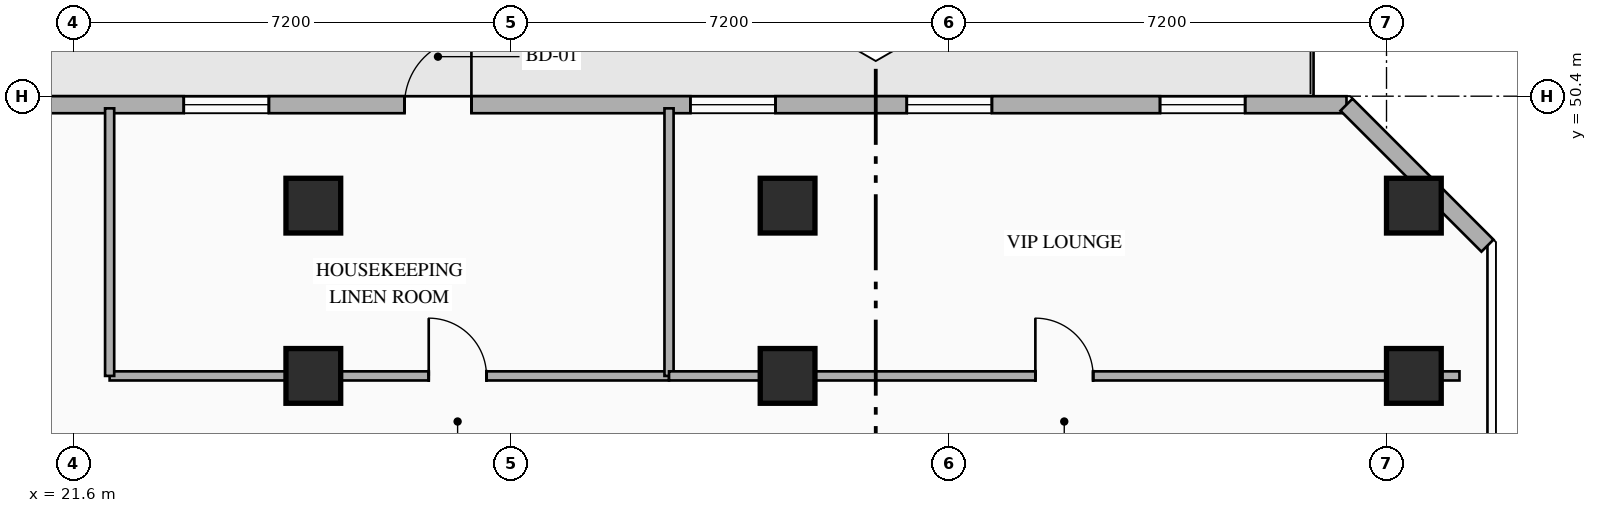
"""IFC4 building model, lengths in metres.
Left out: names, types, materials, properties, quantities, classifications, styles, units other than length and angle.
Written with IfcOpenShell. Run it as: python <this file> out.ifc"""

import sys

from ifc_helpers import new_model, si_unit, direction, frame, frame_2d, origin, origin_2d, place, context, subcontext, project, spatial, rectangle, hollow_rectangle, extrude, element, fill, save


model = new_model("IFC4")
c1 = context("Model", 3, precision=1e-05, world=origin(), true_north=direction((0.0, 1.0)))
c2 = subcontext(c1, "Body", "Model", "MODEL_VIEW")
j1 = project(units=[si_unit("LENGTHUNIT", "METRE"), si_unit("PLANEANGLEUNIT", "RADIAN")], contexts=[c1])
p1 = place(None, origin())
s1 = spatial("IfcSite", under=j1, at=p1, CompositionType="ELEMENT")
p2 = place(p1, origin())
s2 = spatial("IfcBuilding", under=s1, at=p2, CompositionType="ELEMENT")
p3 = place(p2, frame((0.0, 0.0, 88.0)))
s3 = spatial("IfcBuildingStorey", under=s2, at=p3, CompositionType="ELEMENT", Elevation=88.0)
for number, where, z_axis, x_axis in (
    (1, (25.55, 45.8, 0.0), (0.0, 0.0, 1.0), (1.0, 0.0, 0.0)),
    (2, (33.35, 45.8, 0.0), (0.0, 0.0, 1.0), (1.0, 0.0, 0.0)),
    (3, (43.65, 45.8, 0.0), (0.0, 0.0, 1.0), (1.0, 0.0, 0.0)),
    (4, (25.55, 48.6, 0.0), (0.0, 0.0, 1.0), (1.0, 0.0, 0.0)),
    (5, (33.35, 48.6, 0.0), (0.0, 0.0, 1.0), (1.0, 0.0, 0.0)),
    (6, (43.65, 48.6, 0.0), (0.0, 0.0, 1.0), (1.0, 0.0, 0.0)),
):
    element("IfcColumn", number, at=place(p3, frame(where, z_axis=z_axis, x_axis=x_axis)), inside=s3, PredefinedType="COLUMN", context=c2, shape_type="SweptSolid", body=[
        extrude(hollow_rectangle(XDim=0.9, YDim=0.9, WallThickness=0.036, at=origin_2d()), origin(), (0.0, 0.0, 1.0), 3.35),
    ])
p4 = place(p3, frame((12.058, 50.26, 0.0), z_axis=(0.0, 0.0, 1.0), x_axis=(1.0, 0.0, 0.0)))
e7 = element("IfcWall", 7, at=p4, inside=s3, PredefinedType="STANDARD", context=c2, shape_type="SweptSolid", body=[
    extrude(rectangle(XDim=30.484, YDim=0.28, at=frame_2d((15.242, 0.0))), origin(), (0.0, 0.0, 1.0), 3.05),
])
p5 = place(p4, frame((14.992, 0.0, 0.0)))
e8 = element("IfcOpeningElement", 8, at=p5, cuts=e7, PredefinedType="OPENING", context=c2, shape_type="SweptSolid", body=[
    extrude(rectangle(XDim=1.1, YDim=2.2, at=frame_2d((0.55, 1.1))), frame((0.0, 0.15, 0.0), z_axis=(0.0, -1.0, 0.0), x_axis=(1.0, 0.0, 0.0)), (0.0, 0.0, 1.0), 0.3),
])
p6 = place(p4, frame((0.46, 0.0, 0.85)))
e9 = element("IfcOpeningElement", 9, at=p6, cuts=e7, PredefinedType="OPENING", context=c2, shape_type="SweptSolid", body=[
    extrude(rectangle(XDim=1.4, YDim=1.8, at=frame_2d((0.7, 0.9))), frame((0.0, 0.15, 0.0), z_axis=(0.0, -1.0, 0.0), x_axis=(1.0, 0.0, 0.0)), (0.0, 0.0, 1.0), 0.3),
])
p7 = place(p4, frame((4.435, 0.0, 0.85)))
e10 = element("IfcOpeningElement", 10, at=p7, cuts=e7, PredefinedType="OPENING", context=c2, shape_type="SweptSolid", body=[
    extrude(rectangle(XDim=1.4, YDim=1.8, at=frame_2d((0.7, 0.9))), frame((0.0, 0.15, 0.0), z_axis=(0.0, -1.0, 0.0), x_axis=(1.0, 0.0, 0.0)), (0.0, 0.0, 1.0), 0.3),
])
p8 = place(p4, frame((11.361, 0.0, 0.85)))
e11 = element("IfcOpeningElement", 11, at=p8, cuts=e7, PredefinedType="OPENING", context=c2, shape_type="SweptSolid", body=[
    extrude(rectangle(XDim=1.4, YDim=1.8, at=frame_2d((0.7, 0.9))), frame((0.0, 0.15, 0.0), z_axis=(0.0, -1.0, 0.0), x_axis=(1.0, 0.0, 0.0)), (0.0, 0.0, 1.0), 0.3),
])
p9 = place(p4, frame((19.693, 0.0, 0.85)))
e12 = element("IfcOpeningElement", 12, at=p9, cuts=e7, PredefinedType="OPENING", context=c2, shape_type="SweptSolid", body=[
    extrude(rectangle(XDim=1.4, YDim=1.8, at=frame_2d((0.7, 0.9))), frame((0.0, 0.15, 0.0), z_axis=(0.0, -1.0, 0.0), x_axis=(1.0, 0.0, 0.0)), (0.0, 0.0, 1.0), 0.3),
])
p10 = place(p4, frame((23.252, 0.0, 0.85)))
e13 = element("IfcOpeningElement", 13, at=p10, cuts=e7, PredefinedType="OPENING", context=c2, shape_type="SweptSolid", body=[
    extrude(rectangle(XDim=1.4, YDim=1.8, at=frame_2d((0.7, 0.9))), frame((0.0, 0.15, 0.0), z_axis=(0.0, -1.0, 0.0), x_axis=(1.0, 0.0, 0.0)), (0.0, 0.0, 1.0), 0.3),
])
p11 = place(p4, frame((27.417, 0.0, 0.85)))
e14 = element("IfcOpeningElement", 14, at=p11, cuts=e7, PredefinedType="OPENING", context=c2, shape_type="SweptSolid", body=[
    extrude(rectangle(XDim=1.4, YDim=1.8, at=frame_2d((0.7, 0.9))), frame((0.0, 0.15, 0.0), z_axis=(0.0, -1.0, 0.0), x_axis=(1.0, 0.0, 0.0)), (0.0, 0.0, 1.0), 0.3),
])
p12 = place(p3, frame((42.542, 50.26, 0.0), z_axis=(0.0, 0.0, 1.0), x_axis=(0.707106781187, -0.707106781187, 0.0)))
e15 = element("IfcWall", 15, at=p12, inside=s3, PredefinedType="STANDARD", context=c2, shape_type="SweptSolid", body=[
    extrude(rectangle(XDim=3.278, YDim=0.28, at=frame_2d((1.639, 0.0))), origin(), (0.0, 0.0, 1.0), 3.05),
])
p13 = place(p3, frame((22.2, 45.8, 0.0), z_axis=(0.0, 0.0, 1.0), x_axis=(1.0, 0.0, 0.0)))
e16 = element("IfcWall", 16, at=p13, inside=s3, PredefinedType="PARTITIONING", context=c2, shape_type="SweptSolid", body=[
    extrude(rectangle(XDim=9.2, YDim=0.15, at=frame_2d((4.6, 0.0))), origin(), (0.0, 0.0, 1.0), 2.345),
])
p14 = place(p13, frame((5.248, 0.0, 0.0)))
e17 = element("IfcOpeningElement", 17, at=p14, cuts=e16, PredefinedType="OPENING", context=c2, shape_type="SweptSolid", body=[
    extrude(rectangle(XDim=0.95, YDim=2.15, at=frame_2d((0.475, 1.075))), frame((0.0, 0.085, 0.0), z_axis=(0.0, -1.0, 0.0), x_axis=(1.0, 0.0, 0.0)), (0.0, 0.0, 1.0), 0.17),
])
for number, where, z_axis, x_axis in (
    (18, (22.2, 45.8, 0.0), (0.0, 0.0, 1.0), (0.0, 1.0, 0.0)),
    (19, (31.4, 45.8, 0.0), (0.0, 0.0, 1.0), (0.0, 1.0, 0.0)),
):
    element("IfcWall", number, at=place(p3, frame(where, z_axis=z_axis, x_axis=x_axis)), inside=s3, PredefinedType="PARTITIONING", context=c2, shape_type="SweptSolid", body=[
        extrude(rectangle(XDim=4.4, YDim=0.15, at=frame_2d((2.2, 0.0))), origin(), (0.0, 0.0, 1.0), 3.05),
    ])
p15 = place(p3, frame((31.4, 45.8, 0.0), z_axis=(0.0, 0.0, 1.0), x_axis=(1.0, 0.0, 0.0)))
e20 = element("IfcWall", 20, at=p15, inside=s3, PredefinedType="PARTITIONING", context=c2, shape_type="SweptSolid", body=[
    extrude(rectangle(XDim=13.0, YDim=0.15, at=frame_2d((6.5, 0.0))), origin(), (0.0, 0.0, 1.0), 2.345),
])
p16 = place(p15, frame((6.025, 0.0, 0.0)))
e21 = element("IfcOpeningElement", 21, at=p16, cuts=e20, PredefinedType="OPENING", context=c2, shape_type="SweptSolid", body=[
    extrude(rectangle(XDim=0.95, YDim=2.15, at=frame_2d((0.475, 1.075))), frame((0.0, 0.085, 0.0), z_axis=(0.0, -1.0, 0.0), x_axis=(1.0, 0.0, 0.0)), (0.0, 0.0, 1.0), 0.17),
])
p17 = place(p5, origin())
e22 = element("IfcDoor", 22, at=p17, inside=s3, OperationType="SINGLE_SWING_RIGHT", PredefinedType="DOOR", context=c2, shape_type="SweptSolid", body=[
    extrude(rectangle(XDim=1.1, YDim=2.2, at=frame_2d((0.55, 1.1))), frame((0.0, 0.025, 0.0), z_axis=(0.0, -1.0, 0.0), x_axis=(1.0, 0.0, 0.0)), (0.0, 0.0, 1.0), 0.05),
])
fill(e8, e22)
p18 = place(p8, origin())
e23 = element("IfcWindow", 23, at=p18, inside=s3, PartitioningType="SINGLE_PANEL", PredefinedType="WINDOW", context=c2, shape_type="SweptSolid", body=[
    extrude(rectangle(XDim=1.4, YDim=1.8, at=frame_2d((0.7, 0.9))), frame((0.0, 0.03, 0.0), z_axis=(0.0, -1.0, 0.0), x_axis=(1.0, 0.0, 0.0)), (0.0, 0.0, 1.0), 0.06),
])
fill(e11, e23)
p19 = place(p9, origin())
e24 = element("IfcWindow", 24, at=p19, inside=s3, PartitioningType="SINGLE_PANEL", PredefinedType="WINDOW", context=c2, shape_type="SweptSolid", body=[
    extrude(rectangle(XDim=1.4, YDim=1.8, at=frame_2d((0.7, 0.9))), frame((0.0, 0.03, 0.0), z_axis=(0.0, -1.0, 0.0), x_axis=(1.0, 0.0, 0.0)), (0.0, 0.0, 1.0), 0.06),
])
fill(e12, e24)
p20 = place(p10, origin())
e25 = element("IfcWindow", 25, at=p20, inside=s3, PartitioningType="SINGLE_PANEL", PredefinedType="WINDOW", context=c2, shape_type="SweptSolid", body=[
    extrude(rectangle(XDim=1.4, YDim=1.8, at=frame_2d((0.7, 0.9))), frame((0.0, 0.03, 0.0), z_axis=(0.0, -1.0, 0.0), x_axis=(1.0, 0.0, 0.0)), (0.0, 0.0, 1.0), 0.06),
])
fill(e13, e25)
p21 = place(p11, origin())
e26 = element("IfcWindow", 26, at=p21, inside=s3, PartitioningType="SINGLE_PANEL", PredefinedType="WINDOW", context=c2, shape_type="SweptSolid", body=[
    extrude(rectangle(XDim=1.4, YDim=1.8, at=frame_2d((0.7, 0.9))), frame((0.0, 0.03, 0.0), z_axis=(0.0, -1.0, 0.0), x_axis=(1.0, 0.0, 0.0)), (0.0, 0.0, 1.0), 0.06),
])
fill(e14, e26)
p22 = place(p14, origin())
e27 = element("IfcDoor", 27, at=p22, inside=s3, OperationType="SINGLE_SWING_LEFT", PredefinedType="DOOR", context=c2, shape_type="SweptSolid", body=[
    extrude(rectangle(XDim=0.95, YDim=2.15, at=frame_2d((0.475, 1.075))), frame((0.0, 0.025, 0.0), z_axis=(0.0, -1.0, 0.0), x_axis=(1.0, 0.0, 0.0)), (0.0, 0.0, 1.0), 0.05),
])
fill(e17, e27)
p23 = place(p16, origin())
e28 = element("IfcDoor", 28, at=p23, inside=s3, OperationType="SINGLE_SWING_LEFT", PredefinedType="DOOR", context=c2, shape_type="SweptSolid", body=[
    extrude(rectangle(XDim=0.95, YDim=2.15, at=frame_2d((0.475, 1.075))), frame((0.0, 0.025, 0.0), z_axis=(0.0, -1.0, 0.0), x_axis=(1.0, 0.0, 0.0)), (0.0, 0.0, 1.0), 0.05),
])
fill(e21, e28)
save(model, sys.argv[1])
